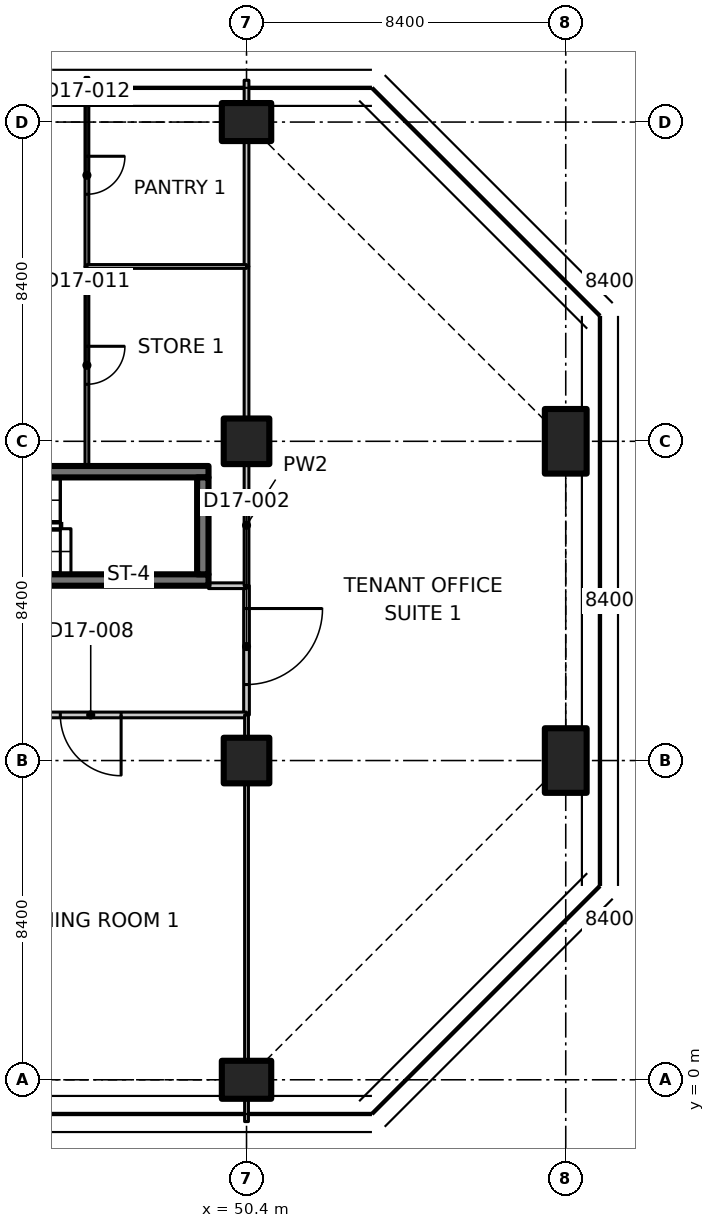
"""IFC4 building model, lengths in metres.
Left out: names, types, materials, properties, quantities, classifications, styles, units other than length and angle.
Written with IfcOpenShell. Run it as: python <this file> out.ifc"""

import sys

from ifc_helpers import new_model, si_unit, direction, frame, frame_2d, origin, origin_2d, place, context, subcontext, project, spatial, polyline, rectangle, outline, extrude, element, fill, save


model = new_model("IFC4")
c1 = context("Model", 3, precision=1e-05, world=origin(), true_north=direction((0.0, 1.0)))
c2 = subcontext(c1, "Body", "Model", "MODEL_VIEW")
j1 = project(units=[si_unit("LENGTHUNIT", "METRE"), si_unit("PLANEANGLEUNIT", "RADIAN")], contexts=[c1])
p1 = place(None, origin())
s1 = spatial("IfcSite", under=j1, at=p1, CompositionType="ELEMENT")
p2 = place(p1, origin())
s2 = spatial("IfcBuilding", under=s1, at=p2, CompositionType="ELEMENT")
p3 = place(p2, frame((0.0, 0.0, 138.5)))
s3 = spatial("IfcBuildingStorey", under=s2, at=p3, CompositionType="ELEMENT", Elevation=138.5)
p4 = place(p3, frame((50.4, 0.0, 0.0), z_axis=(0.0, 0.0, 1.0), x_axis=(0.0, 1.0, 0.0)))
e1 = element("IfcColumn", 1, at=p4, inside=s3, PredefinedType="COLUMN", context=c2, shape_type="SweptSolid", body=[
    extrude(rectangle(XDim=1.0, YDim=1.3, at=origin_2d()), origin(), (0.0, 0.0, 1.0), 3.35),
])
for number, where, z_axis, x_axis in (
    (2, (50.4, 8.4, 0.0), (0.0, 0.0, 1.0), (1.0, 0.0, 0.0)),
    (3, (50.4, 16.8, 0.0), (0.0, 0.0, 1.0), (1.0, 0.0, 0.0)),
):
    element("IfcColumn", number, at=place(p3, frame(where, z_axis=z_axis, x_axis=x_axis)), inside=s3, PredefinedType="COLUMN", context=c2, shape_type="SweptSolid", body=[
        extrude(rectangle(XDim=1.2, YDim=1.2, at=origin_2d()), origin(), (0.0, 0.0, 1.0), 3.35),
    ])
p5 = place(p3, frame((50.4, 25.2, 0.0), z_axis=(0.0, 0.0, 1.0), x_axis=(0.0, 1.0, 0.0)))
e4 = element("IfcColumn", 4, at=p5, inside=s3, PredefinedType="COLUMN", context=c2, shape_type="SweptSolid", body=[
    extrude(rectangle(XDim=1.0, YDim=1.3, at=origin_2d()), origin(), (0.0, 0.0, 1.0), 3.35),
])
for number, where, z_axis, x_axis in (
    (5, (58.8, 8.4, 0.0), (0.0, 0.0, 1.0), (1.0, 0.0, 0.0)),
    (6, (58.8, 16.8, 0.0), (0.0, 0.0, 1.0), (1.0, 0.0, 0.0)),
):
    element("IfcColumn", number, at=place(p3, frame(where, z_axis=z_axis, x_axis=x_axis)), inside=s3, PredefinedType="COLUMN", context=c2, shape_type="SweptSolid", body=[
        extrude(rectangle(XDim=1.1, YDim=1.7, at=origin_2d()), origin(), (0.0, 0.0, 1.0), 3.35),
    ])
p6 = place(p3, frame((49.4, 13.15, 0.0), z_axis=(0.0, 0.0, 1.0), x_axis=(-1.0, 0.0, 0.0)))
e7 = element("IfcWall", 7, at=p6, inside=s3, PredefinedType="SHEAR", context=c2, shape_type="SweptSolid", body=[
    extrude(rectangle(XDim=8.2, YDim=0.3, at=frame_2d((4.1, 0.0))), origin(), (0.0, 0.0, 1.0), 3.35),
])
p7 = place(p6, frame((6.8, 0.0, 0.0)))
e8 = element("IfcOpeningElement", 8, at=p7, cuts=e7, PredefinedType="OPENING", context=c2, shape_type="SweptSolid", body=[
    extrude(rectangle(XDim=1.0, YDim=2.1, at=frame_2d((0.5, 1.05))), frame((0.0, 0.16, 0.0), z_axis=(0.0, -1.0, 0.0), x_axis=(1.0, 0.0, 0.0)), (0.0, 0.0, 1.0), 0.32),
])
p8 = place(p3, frame((41.2, 16.0, 0.0), z_axis=(0.0, 0.0, 1.0), x_axis=(1.0, 0.0, 0.0)))
e9 = element("IfcWall", 9, at=p8, inside=s3, PredefinedType="SHEAR", context=c2, shape_type="SweptSolid", body=[
    extrude(rectangle(XDim=8.2, YDim=0.3, at=frame_2d((4.1, 0.0))), origin(), (0.0, 0.0, 1.0), 3.35),
])
p9 = place(p3, frame((49.25, 13.3, 0.0), z_axis=(0.0, 0.0, 1.0), x_axis=(0.0, 1.0, 0.0)))
e10 = element("IfcWall", 10, at=p9, inside=s3, PredefinedType="SHEAR", context=c2, shape_type="SweptSolid", body=[
    extrude(rectangle(XDim=2.55, YDim=0.3, at=frame_2d((1.275, 0.0))), origin(), (0.0, 0.0, 1.0), 3.35),
])
p10 = place(p3, frame((50.4, 13.0, 0.0), z_axis=(0.0, 0.0, 1.0), x_axis=(0.0, -1.0, 0.0)))
e11 = element("IfcWall", 11, at=p10, inside=s3, PredefinedType="PARTITIONING", context=c2, shape_type="SweptSolid", body=[
    extrude(rectangle(XDim=3.4, YDim=0.15, at=frame_2d((1.7, 0.0))), origin(), (0.0, 0.0, 1.0), 3.33),
])
p11 = place(p10, frame((0.6, 0.0, 0.0)))
e12 = element("IfcOpeningElement", 12, at=p11, cuts=e11, PredefinedType="OPENING", context=c2, shape_type="SweptSolid", body=[
    extrude(rectangle(XDim=2.0, YDim=2.4, at=frame_2d((1.0, 1.2))), frame((0.0, 0.085, 0.0), z_axis=(0.0, -1.0, 0.0), x_axis=(1.0, 0.0, 0.0)), (0.0, 0.0, 1.0), 0.17),
])
p12 = place(p3, frame((50.4, 9.6, 0.0), z_axis=(0.0, 0.0, 1.0), x_axis=(-1.0, 0.0, 0.0)))
e13 = element("IfcWall", 13, at=p12, inside=s3, PredefinedType="PARTITIONING", context=c2, shape_type="SweptSolid", body=[
    extrude(rectangle(XDim=8.4, YDim=0.15, at=frame_2d((4.2, 0.0))), origin(), (0.0, 0.0, 1.0), 3.33),
])
p13 = place(p12, frame((3.3, 0.0, 0.0)))
e14 = element("IfcOpeningElement", 14, at=p13, cuts=e13, PredefinedType="OPENING", context=c2, shape_type="SweptSolid", body=[
    extrude(rectangle(XDim=1.6, YDim=2.1, at=frame_2d((0.8, 1.05))), frame((0.0, 0.085, 0.0), z_axis=(0.0, -1.0, 0.0), x_axis=(1.0, 0.0, 0.0)), (0.0, 0.0, 1.0), 0.17),
])
p14 = place(p3, frame((49.4, 13.0, 0.0), z_axis=(0.0, 0.0, 1.0), x_axis=(1.0, 0.0, 0.0)))
e15 = element("IfcWall", 15, at=p14, inside=s3, PredefinedType="PARTITIONING", context=c2, shape_type="SweptSolid", body=[
    extrude(rectangle(XDim=1.0, YDim=0.15, at=frame_2d((0.5, 0.0))), origin(), (0.0, 0.0, 1.0), 3.33),
])
p15 = place(p3, frame((50.4, -1.1, 0.0), z_axis=(0.0, 0.0, 1.0), x_axis=(0.0, 1.0, 0.0)))
e16 = element("IfcWall", 16, at=p15, inside=s3, PredefinedType="PARTITIONING", context=c2, shape_type="SweptSolid", body=[
    extrude(rectangle(XDim=0.58, YDim=0.1, at=frame_2d((0.29, 0.0))), origin(), (0.0, 0.0, 1.0), 3.33),
])
p16 = place(p3, frame((50.4, 0.52, 0.0), z_axis=(0.0, 0.0, 1.0), x_axis=(0.0, 1.0, 0.0)))
e17 = element("IfcWall", 17, at=p16, inside=s3, PredefinedType="PARTITIONING", context=c2, shape_type="SweptSolid", body=[
    extrude(outline(polyline([(0.0, 0.0), (7.26, 0.0), (7.26, 3.33), (0.146, 3.33), (0.144, 2.98), (0.0, 2.98), (0.0, 0.0)])), frame((0.0, 0.05, 0.0), z_axis=(0.0, -1.0, 0.0), x_axis=(1.0, 0.0, 0.0)), (0.0, 0.0, 1.0), 0.1),
])
p17 = place(p3, frame((50.4, 9.02, 0.0), z_axis=(0.0, 0.0, 1.0), x_axis=(0.0, 1.0, 0.0)))
e18 = element("IfcWall", 18, at=p17, inside=s3, PredefinedType="PARTITIONING", context=c2, shape_type="SweptSolid", body=[
    extrude(rectangle(XDim=0.58, YDim=0.1, at=frame_2d((0.29, 0.0))), origin(), (0.0, 0.0, 1.0), 3.33),
])
p18 = place(p3, frame((50.4, 13.0, 0.0), z_axis=(0.0, 0.0, 1.0), x_axis=(0.0, 1.0, 0.0)))
e19 = element("IfcWall", 19, at=p18, inside=s3, PredefinedType="PARTITIONING", context=c2, shape_type="SweptSolid", body=[
    extrude(rectangle(XDim=3.18, YDim=0.125, at=frame_2d((1.59, 0.0))), origin(), (0.0, 0.0, 1.0), 3.33),
])
p19 = place(p3, frame((50.4, 17.42, 0.0), z_axis=(0.0, 0.0, 1.0), x_axis=(0.0, 1.0, 0.0)))
e20 = element("IfcWall", 20, at=p19, inside=s3, PredefinedType="PARTITIONING", context=c2, shape_type="SweptSolid", body=[
    extrude(rectangle(XDim=3.98, YDim=0.125, at=frame_2d((1.99, 0.0))), origin(), (0.0, 0.0, 1.0), 3.33),
])
p20 = place(p3, frame((50.4, 21.4, 0.0), z_axis=(0.0, 0.0, 1.0), x_axis=(0.0, 1.0, 0.0)))
e21 = element("IfcWall", 21, at=p20, inside=s3, PredefinedType="PARTITIONING", context=c2, shape_type="SweptSolid", body=[
    extrude(rectangle(XDim=3.28, YDim=0.125, at=frame_2d((1.64, 0.0))), origin(), (0.0, 0.0, 1.0), 2.98),
])
p21 = place(p3, frame((50.4, 25.72, 0.0), z_axis=(0.0, 0.0, 1.0), x_axis=(0.0, 1.0, 0.0)))
e22 = element("IfcWall", 22, at=p21, inside=s3, PredefinedType="PARTITIONING", context=c2, shape_type="SweptSolid", body=[
    extrude(rectangle(XDim=0.58, YDim=0.125, at=frame_2d((0.29, 0.0))), origin(), (0.0, 0.0, 1.0), 3.33),
])
p22 = place(p3, frame((46.2, 21.4, 0.0), z_axis=(0.0, 0.0, 1.0), x_axis=(0.0, -1.0, 0.0)))
e23 = element("IfcWall", 23, at=p22, inside=s3, PredefinedType="PARTITIONING", context=c2, shape_type="SweptSolid", body=[
    extrude(rectangle(XDim=5.25, YDim=0.1, at=frame_2d((2.625, 0.0))), origin(), (0.0, 0.0, 1.0), 3.33),
])
p23 = place(p22, frame((2.1, 0.0, 0.0)))
e24 = element("IfcOpeningElement", 24, at=p23, cuts=e23, PredefinedType="OPENING", context=c2, shape_type="SweptSolid", body=[
    extrude(rectangle(XDim=1.0, YDim=2.1, at=frame_2d((0.5, 1.05))), frame((0.0, 0.06, 0.0), z_axis=(0.0, -1.0, 0.0), x_axis=(1.0, 0.0, 0.0)), (0.0, 0.0, 1.0), 0.12),
])
p24 = place(p3, frame((46.2, 26.374, 0.0), z_axis=(0.0, 0.0, 1.0), x_axis=(0.0, -1.0, 0.0)))
e25 = element("IfcWall", 25, at=p24, inside=s3, PredefinedType="PARTITIONING", context=c2, shape_type="SweptSolid", body=[
    extrude(outline(polyline([(0.0, 0.0), (4.974, 0.0), (4.974, 3.33), (1.624, 3.33), (1.622, 2.98), (0.726, 2.98), (0.724, 3.33), (0.074, 3.33), (0.0, 3.33), (0.0, 0.0)])), frame((0.0, 0.05, 0.0), z_axis=(0.0, -1.0, 0.0), x_axis=(1.0, 0.0, 0.0)), (0.0, 0.0, 1.0), 0.1),
])
p25 = place(p24, frame((2.074, 0.0, 0.0)))
e26 = element("IfcOpeningElement", 26, at=p25, cuts=e25, PredefinedType="OPENING", context=c2, shape_type="SweptSolid", body=[
    extrude(rectangle(XDim=1.0, YDim=2.1, at=frame_2d((0.5, 1.05))), frame((0.0, 0.06, 0.0), z_axis=(0.0, -1.0, 0.0), x_axis=(1.0, 0.0, 0.0)), (0.0, 0.0, 1.0), 0.12),
])
p26 = place(p3, frame((46.2, 21.4, 0.0), z_axis=(0.0, 0.0, 1.0), x_axis=(1.0, 0.0, 0.0)))
e27 = element("IfcWall", 27, at=p26, inside=s3, PredefinedType="PARTITIONING", context=c2, shape_type="SweptSolid", body=[
    extrude(rectangle(XDim=4.2, YDim=0.1, at=frame_2d((2.1, 0.0))), origin(), (0.0, 0.0, 1.0), 3.33),
])
p27 = place(p11, origin())
e28 = element("IfcDoor", 28, at=p27, inside=s3, OperationType="DOUBLE_DOOR_SINGLE_SWING", PredefinedType="DOOR", context=c2, shape_type="SweptSolid", body=[
    extrude(rectangle(XDim=2.0, YDim=2.4, at=frame_2d((1.0, 1.2))), frame((0.0, 0.025, 0.0), z_axis=(0.0, -1.0, 0.0), x_axis=(1.0, 0.0, 0.0)), (0.0, 0.0, 1.0), 0.05),
])
fill(e12, e28)
p28 = place(p13, origin())
e29 = element("IfcDoor", 29, at=p28, inside=s3, OperationType="DOUBLE_DOOR_SINGLE_SWING", PredefinedType="DOOR", context=c2, shape_type="SweptSolid", body=[
    extrude(rectangle(XDim=1.6, YDim=2.1, at=frame_2d((0.8, 1.05))), frame((0.0, 0.025, 0.0), z_axis=(0.0, -1.0, 0.0), x_axis=(1.0, 0.0, 0.0)), (0.0, 0.0, 1.0), 0.05),
])
fill(e14, e29)
p29 = place(p23, origin())
e30 = element("IfcDoor", 30, at=p29, inside=s3, OperationType="SINGLE_SWING_LEFT", PredefinedType="DOOR", context=c2, shape_type="SweptSolid", body=[
    extrude(rectangle(XDim=1.0, YDim=2.1, at=frame_2d((0.5, 1.05))), frame((0.0, 0.025, 0.0), z_axis=(0.0, -1.0, 0.0), x_axis=(1.0, 0.0, 0.0)), (0.0, 0.0, 1.0), 0.05),
])
fill(e24, e30)
p30 = place(p25, origin())
e31 = element("IfcDoor", 31, at=p30, inside=s3, OperationType="SINGLE_SWING_LEFT", PredefinedType="DOOR", context=c2, shape_type="SweptSolid", body=[
    extrude(rectangle(XDim=1.0, YDim=2.1, at=frame_2d((0.5, 1.05))), frame((0.0, 0.025, 0.0), z_axis=(0.0, -1.0, 0.0), x_axis=(1.0, 0.0, 0.0)), (0.0, 0.0, 1.0), 0.05),
])
fill(e26, e31)
save(model, sys.argv[1])
